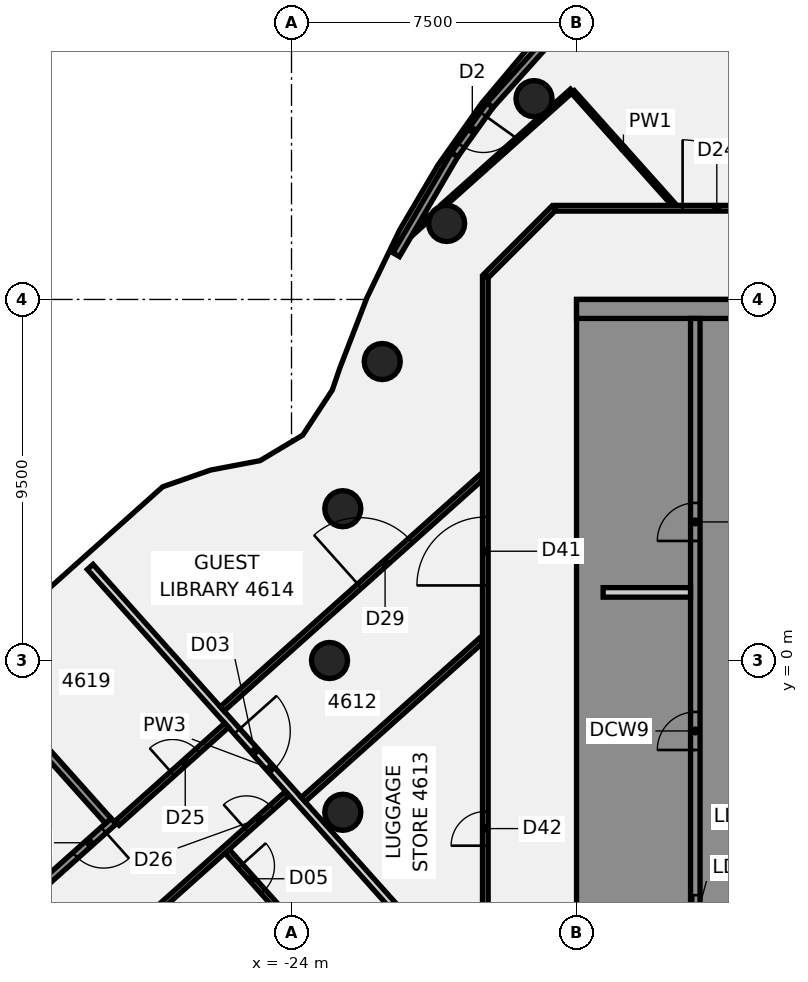
"""IFC4 building model, lengths in metres.
Left out: names, types, materials, properties, quantities, classifications, styles, units other than length and angle.
Written with IfcOpenShell. Run it as: python <this file> out.ifc"""

import sys

from ifc_helpers import new_model, si_unit, direction, frame, frame_2d, origin, origin_2d, place, context, subcontext, project, spatial, polyline, rectangle, circle, outline, extrude, element, fill, save


model = new_model("IFC4")
c1 = context("Model", 3, precision=1e-05, world=origin(), true_north=direction((0.0, 1.0)))
c2 = subcontext(c1, "Body", "Model", "MODEL_VIEW")
j1 = project(units=[si_unit("LENGTHUNIT", "METRE"), si_unit("PLANEANGLEUNIT", "RADIAN")], contexts=[c1])
p1 = place(None, origin())
s1 = spatial("IfcSite", under=j1, at=p1, CompositionType="ELEMENT")
p2 = place(p1, origin())
s2 = spatial("IfcBuilding", under=s1, at=p2, CompositionType="ELEMENT")
p3 = place(p2, frame((0.0, 0.0, 186.1)))
s3 = spatial("IfcBuildingStorey", under=s2, at=p3, CompositionType="ELEMENT", Elevation=186.1)
for number, where, z_axis, x_axis in (
    (1, (-17.619, 14.784, -0.14), (0.0, 0.0, 1.0), (1.0, 0.0, 0.0)),
    (2, (-19.919, 11.5, -0.14), (0.0, 0.0, 1.0), (1.0, 0.0, 0.0)),
    (3, (-21.613, 7.866, -0.14), (0.0, 0.0, 1.0), (1.0, 0.0, 0.0)),
    (4, (-22.651, 3.994, -0.14), (0.0, 0.0, 1.0), (1.0, 0.0, 0.0)),
    (5, (-23.0, 0.0, -0.14), (0.0, 0.0, 1.0), (1.0, 0.0, 0.0)),
    (6, (-22.651, -3.994, -0.14), (0.0, 0.0, 1.0), (1.0, 0.0, 0.0)),
):
    element("IfcColumn", number, at=place(p3, frame(where, z_axis=z_axis, x_axis=x_axis)), inside=s3, PredefinedType="COLUMN", context=c2, shape_type="SweptSolid", body=[
        extrude(circle(Radius=0.475, at=origin_2d()), origin(), (0.0, 0.0, 1.0), 3.6),
    ])
p4 = place(p3, frame((-29.297, 2.462, 0.0), z_axis=(0.0, 0.0, 1.0), x_axis=(0.666350075951, -0.745639038866, 0.0)))
e7 = element("IfcWall", 7, at=p4, inside=s3, PredefinedType="PARTITIONING", context=c2, shape_type="SweptSolid", body=[
    extrude(rectangle(XDim=14.219, YDim=0.2, at=frame_2d((7.11, 0.0))), origin(), (0.0, 0.0, 1.0), 2.864),
])
p5 = place(p4, frame((5.799, 0.0, 0.0)))
e8 = element("IfcOpeningElement", 8, at=p5, cuts=e7, PredefinedType="OPENING", context=c2, shape_type="SweptSolid", body=[
    extrude(rectangle(XDim=1.4, YDim=2.1, at=frame_2d((0.7, 1.05))), frame((0.0, 0.11, 0.0), z_axis=(0.0, -1.0, 0.0), x_axis=(1.0, 0.0, 0.0)), (0.0, 0.0, 1.0), 0.22),
])
p6 = place(p3, frame((-25.695, -5.02, 0.0), z_axis=(0.0, 0.0, 1.0), x_axis=(0.666305353451, -0.7456790033, 0.0)))
e9 = element("IfcWall", 9, at=p6, inside=s3, PredefinedType="PARTITIONING", context=c2, shape_type="SweptSolid", body=[
    extrude(rectangle(XDim=2.479, YDim=0.15, at=frame_2d((1.24, 0.0))), origin(), (0.0, 0.0, 1.0), 2.864),
])
p7 = place(p6, frame((0.52, 0.0, 0.0)))
e10 = element("IfcOpeningElement", 10, at=p7, cuts=e9, PredefinedType="OPENING", context=c2, shape_type="SweptSolid", body=[
    extrude(rectangle(XDim=0.9, YDim=2.1, at=frame_2d((0.45, 1.05))), frame((0.0, 0.085, 0.0), z_axis=(0.0, -1.0, 0.0), x_axis=(1.0, 0.0, 0.0)), (0.0, 0.0, 1.0), 0.17),
])
p8 = place(p3, frame((-16.594, 14.959, 0.0), z_axis=(0.0, 0.0, 1.0), x_axis=(0.66652964255, -0.745478527928, 0.0)))
e11 = element("IfcWall", 11, at=p8, inside=s3, PredefinedType="PARTITIONING", context=c2, shape_type="SweptSolid", body=[
    extrude(rectangle(XDim=3.983, YDim=0.1, at=frame_2d((1.991, 0.0))), origin(), (0.0, 0.0, 1.0), 2.864),
])
p9 = place(p3, frame((-17.065, 11.9, 0.0), z_axis=(0.0, 0.0, 1.0), x_axis=(1.0, 0.0, 0.0)))
e12 = element("IfcWall", 12, at=p9, inside=s3, PredefinedType="PARTITIONING", context=c2, shape_type="SweptSolid", body=[
    extrude(rectangle(XDim=34.165, YDim=0.15, at=frame_2d((17.083, 0.0))), origin(), (0.0, 0.0, 1.0), 2.864),
])
p10 = place(p9, frame((24.547, 0.0, 0.0)))
e13 = element("IfcOpeningElement", 13, at=p10, cuts=e12, PredefinedType="OPENING", context=c2, shape_type="SweptSolid", body=[
    extrude(rectangle(XDim=1.8, YDim=2.1, at=frame_2d((0.9, 1.05))), frame((0.0, 0.085, 0.0), z_axis=(0.0, -1.0, 0.0), x_axis=(1.0, 0.0, 0.0)), (0.0, 0.0, 1.0), 0.17),
])
p11 = place(p9, frame((8.606, 0.0, 0.0)))
e14 = element("IfcOpeningElement", 14, at=p11, cuts=e12, PredefinedType="OPENING", context=c2, shape_type="SweptSolid", body=[
    extrude(rectangle(XDim=1.8, YDim=2.1, at=frame_2d((0.9, 1.05))), frame((0.0, 0.085, 0.0), z_axis=(0.0, -1.0, 0.0), x_axis=(1.0, 0.0, 0.0)), (0.0, 0.0, 1.0), 0.17),
])
p12 = place(p9, frame((3.356, 0.0, 0.0)))
e15 = element("IfcOpeningElement", 15, at=p12, cuts=e12, PredefinedType="OPENING", context=c2, shape_type="SweptSolid", body=[
    extrude(rectangle(XDim=1.8, YDim=2.1, at=frame_2d((0.9, 1.05))), frame((0.0, 0.085, 0.0), z_axis=(0.0, -1.0, 0.0), x_axis=(1.0, 0.0, 0.0)), (0.0, 0.0, 1.0), 0.17),
])
p13 = place(p3, frame((-28.586, -4.278, 0.0), z_axis=(0.0, 0.0, 1.0), x_axis=(0.745550479018, 0.666449160279, 0.0)))
e16 = element("IfcWall", 16, at=p13, inside=s3, PredefinedType="PARTITIONING", context=c2, shape_type="SweptSolid", body=[
    extrude(rectangle(XDim=3.861, YDim=0.15, at=frame_2d((1.931, 0.0))), origin(), (0.0, 0.0, 1.0), 2.864),
])
p14 = place(p13, frame((1.95, 0.0, 0.0)))
e17 = element("IfcOpeningElement", 17, at=p14, cuts=e16, PredefinedType="OPENING", context=c2, shape_type="SweptSolid", body=[
    extrude(rectangle(XDim=0.9, YDim=2.1, at=frame_2d((0.45, 1.05))), frame((0.0, 0.085, 0.0), z_axis=(0.0, -1.0, 0.0), x_axis=(1.0, 0.0, 0.0)), (0.0, 0.0, 1.0), 0.17),
])
p15 = place(p3, frame((-34.039, -12.371, 0.0), z_axis=(0.0, 0.0, 1.0), x_axis=(0.745755249161, 0.666220014972, 0.0)))
e18 = element("IfcWall", 18, at=p15, inside=s3, PredefinedType="PARTITIONING", context=c2, shape_type="SweptSolid", body=[
    extrude(rectangle(XDim=13.301, YDim=0.15, at=frame_2d((6.65, 0.0))), origin(), (0.0, 0.0, 1.0), 2.864),
])
p16 = place(p15, frame((11.871, 0.0, 0.0)))
e19 = element("IfcOpeningElement", 19, at=p16, cuts=e18, PredefinedType="OPENING", context=c2, shape_type="SweptSolid", body=[
    extrude(rectangle(XDim=0.9, YDim=2.1, at=frame_2d((0.45, 1.05))), frame((0.0, 0.085, 0.0), z_axis=(0.0, -1.0, 0.0), x_axis=(1.0, 0.0, 0.0)), (0.0, 0.0, 1.0), 0.17),
])
p17 = place(p15, frame((5.32, 0.0, 0.0)))
e20 = element("IfcOpeningElement", 20, at=p17, cuts=e18, PredefinedType="OPENING", context=c2, shape_type="SweptSolid", body=[
    extrude(rectangle(XDim=0.9, YDim=2.1, at=frame_2d((0.45, 1.05))), frame((0.0, 0.085, 0.0), z_axis=(0.0, -1.0, 0.0), x_axis=(1.0, 0.0, 0.0)), (0.0, 0.0, 1.0), 0.17),
])
p18 = place(p15, frame((3.021, 0.0, 0.0)))
e21 = element("IfcOpeningElement", 21, at=p18, cuts=e18, PredefinedType="OPENING", context=c2, shape_type="SweptSolid", body=[
    extrude(rectangle(XDim=0.9, YDim=2.1, at=frame_2d((0.45, 1.05))), frame((0.0, 0.085, 0.0), z_axis=(0.0, -1.0, 0.0), x_axis=(1.0, 0.0, 0.0)), (0.0, 0.0, 1.0), 0.17),
])
p19 = place(p3, frame((-25.824, -1.273, 0.0), z_axis=(0.0, 0.0, 1.0), x_axis=(0.745520592409, 0.666482592641, 0.0)))
e22 = element("IfcWall", 22, at=p19, inside=s3, PredefinedType="PARTITIONING", context=c2, shape_type="SweptSolid", body=[
    extrude(rectangle(XDim=9.143, YDim=0.15, at=frame_2d((4.572, 0.0))), origin(), (0.0, 0.0, 1.0), 2.864),
])
p20 = place(p19, frame((4.85, 0.0, 0.0)))
e23 = element("IfcOpeningElement", 23, at=p20, cuts=e22, PredefinedType="OPENING", context=c2, shape_type="SweptSolid", body=[
    extrude(rectangle(XDim=1.8, YDim=2.1, at=frame_2d((0.9, 1.05))), frame((0.0, 0.085, 0.0), z_axis=(0.0, -1.0, 0.0), x_axis=(1.0, 0.0, 0.0)), (0.0, 0.0, 1.0), 0.17),
])
p21 = place(p3, frame((-23.692, -3.658, 0.0), z_axis=(0.0, 0.0, 1.0), x_axis=(0.745594888816, 0.666399476119, 0.0)))
e24 = element("IfcWall", 24, at=p21, inside=s3, PredefinedType="PARTITIONING", context=c2, shape_type="SweptSolid", body=[
    extrude(rectangle(XDim=6.283, YDim=0.15, at=frame_2d((3.141, 0.0))), origin(), (0.0, 0.0, 1.0), 2.864),
])
p22 = place(p3, frame((-20.888, 11.188, 0.0), z_axis=(0.0, 0.0, 1.0), x_axis=(0.74557570649, 0.666420937465, 0.0)))
e25 = element("IfcWall", 25, at=p22, inside=s3, PredefinedType="PARTITIONING", context=c2, shape_type="SweptSolid", body=[
    extrude(rectangle(XDim=0.706, YDim=0.1, at=frame_2d((0.353, 0.0))), origin(), (0.0, 0.0, 1.0), 2.864),
])
p23 = place(p3, frame((-20.029, 11.955, 0.0), z_axis=(0.0, 0.0, 1.0), x_axis=(0.745614810603, 0.666377186141, 0.0)))
e26 = element("IfcWall", 26, at=p23, inside=s3, PredefinedType="PARTITIONING", context=c2, shape_type="SweptSolid", body=[
    extrude(rectangle(XDim=4.563, YDim=0.1, at=frame_2d((2.282, 0.0))), origin(), (0.0, 0.0, 1.0), 2.864),
])
p24 = place(p3, frame((-18.872, 10.128, 0.0), z_axis=(0.0, 0.0, 1.0), x_axis=(0.707106781187, 0.707106781187, 0.0)))
e27 = element("IfcWall", 27, at=p24, inside=s3, PredefinedType="PARTITIONING", context=c2, shape_type="SweptSolid", body=[
    extrude(rectangle(XDim=2.505, YDim=0.15, at=frame_2d((1.253, 0.0))), origin(), (0.0, 0.0, 1.0), 2.864),
])
p25 = place(p3, frame((-18.9, -10.1, 0.0), z_axis=(0.0, 0.0, 1.0), x_axis=(0.0, 1.0, 0.0)))
e28 = element("IfcWall", 28, at=p25, inside=s3, PredefinedType="PARTITIONING", context=c2, shape_type="SweptSolid", body=[
    extrude(rectangle(XDim=20.2, YDim=0.15, at=frame_2d((10.1, 0.0))), origin(), (0.0, 0.0, 1.0), 2.864),
])
p26 = place(p25, frame((12.075, 0.0, 0.0)))
e29 = element("IfcOpeningElement", 29, at=p26, cuts=e28, PredefinedType="OPENING", context=c2, shape_type="SweptSolid", body=[
    extrude(rectangle(XDim=1.8, YDim=2.1, at=frame_2d((0.9, 1.05))), frame((0.0, 0.085, 0.0), z_axis=(0.0, -1.0, 0.0), x_axis=(1.0, 0.0, 0.0)), (0.0, 0.0, 1.0), 0.17),
])
p27 = place(p25, frame((5.227, 0.0, 0.0)))
e30 = element("IfcOpeningElement", 30, at=p27, cuts=e28, PredefinedType="OPENING", context=c2, shape_type="SweptSolid", body=[
    extrude(rectangle(XDim=0.9, YDim=2.1, at=frame_2d((0.45, 1.05))), frame((0.0, 0.085, 0.0), z_axis=(0.0, -1.0, 0.0), x_axis=(1.0, 0.0, 0.0)), (0.0, 0.0, 1.0), 0.17),
])
p28 = place(p3, frame((-16.743, 16.881, 0.0), z_axis=(0.0, 0.0, 1.0), x_axis=(-0.667237213311, -0.744845286736, 0.0)))
e31 = element("IfcWall", 31, at=p28, inside=s3, PredefinedType="SOLIDWALL", context=c2, shape_type="SweptSolid", body=[
    extrude(rectangle(XDim=3.048, YDim=0.2, at=frame_2d((1.524, 0.0))), origin(), (0.0, 0.0, 1.0), 3.46),
])
p29 = place(p3, frame((-19.708, 13.309, 0.0), z_axis=(0.0, 0.0, 1.0), x_axis=(-0.504682807399, -0.863304849932, 0.0)))
e32 = element("IfcWall", 32, at=p29, inside=s3, PredefinedType="SOLIDWALL", context=c2, shape_type="SweptSolid", body=[
    extrude(rectangle(XDim=3.047, YDim=0.2, at=frame_2d((1.523, 0.0))), origin(), (0.0, 0.0, 1.0), 3.46),
])
p30 = place(p3, frame((-18.777, 14.611, 0.0), z_axis=(0.0, 0.0, 1.0), x_axis=(-0.58162792214, -0.81345495277, 0.0)))
e33 = element("IfcWall", 33, at=p30, inside=s3, PredefinedType="SOLIDWALL", context=c2, shape_type="SweptSolid", body=[
    extrude(rectangle(XDim=1.6, YDim=0.2, at=frame_2d((0.8, 0.0))), origin(), (0.0, 0.0, 1.0), 3.46),
])
p31 = place(p30, frame((0.3, 0.0, 0.0)))
e34 = element("IfcOpeningElement", 34, at=p31, cuts=e33, PredefinedType="OPENING", context=c2, shape_type="SweptSolid", body=[
    extrude(rectangle(XDim=1.0, YDim=2.4, at=frame_2d((0.5, 1.2))), frame((0.0, 0.11, 0.0), z_axis=(0.0, -1.0, 0.0), x_axis=(1.0, 0.0, 0.0)), (0.0, 0.0, 1.0), 0.22),
])
p32 = place(p3, origin())
e35 = element("IfcWall", 35, at=p32, inside=s3, PredefinedType="SHEAR", context=c2, shape_type="SweptSolid", body=[
    extrude(outline(polyline([(-13.5, -8.125), (-16.0, -8.125), (-16.0, -5.625), (-13.5, -5.625), (-13.5, -5.375), (-16.0, -5.375), (-16.0, 5.375), (-13.5, 5.375), (-13.5, 5.625), (-16.0, 5.625), (-16.0, 8.125), (-13.5, 8.125), (-13.5, 9.0), (-16.0, 9.0), (-16.5, 9.0), (-16.5, -9.0), (-16.0, -9.0), (-13.5, -9.0), (-13.5, -8.125)])), origin(), (0.0, 0.0, 1.0), 3.46),
])
p33 = place(p3, frame((-16.5, 9.25, 0.0), z_axis=(0.0, 0.0, 1.0), x_axis=(1.0, 0.0, 0.0)))
e36 = element("IfcWall", 36, at=p33, inside=s3, PredefinedType="SHEAR", context=c2, shape_type="SweptSolid", body=[
    extrude(rectangle(XDim=13.0, YDim=0.5, at=frame_2d((6.5, 0.0))), origin(), (0.0, 0.0, 1.0), 3.46),
])
p34 = place(p3, frame((-13.375, -9.0, 0.0), z_axis=(0.0, 0.0, 1.0), x_axis=(0.0, 1.0, 0.0)))
e37 = element("IfcWall", 37, at=p34, inside=s3, PredefinedType="SHEAR", context=c2, shape_type="SweptSolid", body=[
    extrude(rectangle(XDim=18.0, YDim=0.25, at=frame_2d((9.0, 0.0))), origin(), (0.0, 0.0, 1.0), 3.46),
])
p35 = place(p34, frame((1.425, 0.0, 0.0)))
e38 = element("IfcOpeningElement", 38, at=p35, cuts=e37, PredefinedType="OPENING", context=c2, shape_type="SweptSolid", body=[
    extrude(rectangle(XDim=1.4, YDim=2.1, at=frame_2d((0.7, 1.05))), frame((0.0, 0.135, 0.0), z_axis=(0.0, -1.0, 0.0), x_axis=(1.0, 0.0, 0.0)), (0.0, 0.0, 1.0), 0.27),
])
p36 = place(p34, frame((6.646, 0.0, 0.0)))
e39 = element("IfcOpeningElement", 39, at=p36, cuts=e37, PredefinedType="OPENING", context=c2, shape_type="SweptSolid", body=[
    extrude(rectangle(XDim=1.0, YDim=2.1, at=frame_2d((0.5, 1.05))), frame((0.0, 0.135, 0.0), z_axis=(0.0, -1.0, 0.0), x_axis=(1.0, 0.0, 0.0)), (0.0, 0.0, 1.0), 0.27),
])
p37 = place(p34, frame((12.146, 0.0, 0.0)))
e40 = element("IfcOpeningElement", 40, at=p37, cuts=e37, PredefinedType="OPENING", context=c2, shape_type="SweptSolid", body=[
    extrude(rectangle(XDim=1.0, YDim=2.1, at=frame_2d((0.5, 1.05))), frame((0.0, 0.135, 0.0), z_axis=(0.0, -1.0, 0.0), x_axis=(1.0, 0.0, 0.0)), (0.0, 0.0, 1.0), 0.27),
])
p38 = place(p3, frame((-15.8, 1.792, 0.0), z_axis=(0.0, 0.0, 1.0), x_axis=(1.0, 0.0, 0.0)))
e41 = element("IfcWall", 41, at=p38, inside=s3, PredefinedType="PARTITIONING", context=c2, shape_type="SweptSolid", body=[
    extrude(rectangle(XDim=2.3, YDim=0.25, at=frame_2d((1.15, 0.0))), origin(), (0.0, 0.0, 1.0), 3.46),
])
p39 = place(p3, frame((-28.682, -4.229, -0.14), z_axis=(0.0, 0.0, 1.0), x_axis=(-0.745554780112, -0.666444348654, 0.0)))
e42 = element("IfcWall", 42, at=p39, inside=s3, PredefinedType="SHEAR", context=c2, shape_type="SweptSolid", body=[
    extrude(rectangle(XDim=6.7, YDim=0.2, at=frame_2d((3.35, 0.0))), origin(), (0.0, 0.0, 1.0), 3.004),
])
p40 = place(p39, frame((0.35, 0.0, 0.0)))
e43 = element("IfcOpeningElement", 43, at=p40, cuts=e42, PredefinedType="OPENING", context=c2, shape_type="SweptSolid", body=[
    extrude(rectangle(XDim=1.0, YDim=2.1, at=frame_2d((0.5, 1.05))), frame((0.0, 0.11, 0.0), z_axis=(0.0, -1.0, 0.0), x_axis=(1.0, 0.0, 0.0)), (0.0, 0.0, 1.0), 0.22),
])
p41 = place(p3, frame((-30.956, -1.835, -0.14), z_axis=(0.0, 0.0, 1.0), x_axis=(0.666440186515, -0.745558500587, 0.0)))
e44 = element("IfcWall", 44, at=p41, inside=s3, PredefinedType="SHEAR", context=c2, shape_type="SweptSolid", body=[
    extrude(rectangle(XDim=3.2, YDim=0.2, at=frame_2d((1.6, 0.0))), origin(), (0.0, 0.0, 1.0), 3.004),
])
p42 = place(p5, origin())
e45 = element("IfcDoor", 45, at=p42, inside=s3, OperationType="DOUBLE_DOOR_SINGLE_SWING", PredefinedType="DOOR", context=c2, shape_type="SweptSolid", body=[
    extrude(rectangle(XDim=1.4, YDim=2.1, at=frame_2d((0.7, 1.05))), frame((0.0, 0.025, 0.0), z_axis=(0.0, -1.0, 0.0), x_axis=(1.0, 0.0, 0.0)), (0.0, 0.0, 1.0), 0.05),
])
fill(e8, e45)
p43 = place(p7, frame((0.9, 0.0, 0.0), z_axis=(0.0, 0.0, 1.0), x_axis=(-1.0, 0.0, 0.0)))
e46 = element("IfcDoor", 46, at=p43, inside=s3, OperationType="SINGLE_SWING_LEFT", PredefinedType="DOOR", context=c2, shape_type="SweptSolid", body=[
    extrude(rectangle(XDim=0.9, YDim=2.1, at=frame_2d((0.45, 1.05))), frame((0.0, 0.025, 0.0), z_axis=(0.0, -1.0, 0.0), x_axis=(1.0, 0.0, 0.0)), (0.0, 0.0, 1.0), 0.05),
])
fill(e10, e46)
p44 = place(p12, origin())
e47 = element("IfcDoor", 47, at=p44, inside=s3, OperationType="DOUBLE_DOOR_SINGLE_SWING", PredefinedType="DOOR", context=c2, shape_type="SweptSolid", body=[
    extrude(rectangle(XDim=1.8, YDim=2.1, at=frame_2d((0.9, 1.05))), frame((0.0, 0.025, 0.0), z_axis=(0.0, -1.0, 0.0), x_axis=(1.0, 0.0, 0.0)), (0.0, 0.0, 1.0), 0.05),
])
fill(e15, e47)
p45 = place(p14, origin())
e48 = element("IfcDoor", 48, at=p45, inside=s3, OperationType="SINGLE_SWING_LEFT", PredefinedType="DOOR", context=c2, shape_type="SweptSolid", body=[
    extrude(rectangle(XDim=0.9, YDim=2.1, at=frame_2d((0.45, 1.05))), frame((0.0, 0.025, 0.0), z_axis=(0.0, -1.0, 0.0), x_axis=(1.0, 0.0, 0.0)), (0.0, 0.0, 1.0), 0.05),
])
fill(e17, e48)
p46 = place(p16, frame((0.9, 0.0, 0.0), z_axis=(0.0, 0.0, 1.0), x_axis=(-1.0, 0.0, 0.0)))
e49 = element("IfcDoor", 49, at=p46, inside=s3, OperationType="SINGLE_SWING_RIGHT", PredefinedType="DOOR", context=c2, shape_type="SweptSolid", body=[
    extrude(rectangle(XDim=0.9, YDim=2.1, at=frame_2d((0.45, 1.05))), frame((0.0, 0.025, 0.0), z_axis=(0.0, -1.0, 0.0), x_axis=(1.0, 0.0, 0.0)), (0.0, 0.0, 1.0), 0.05),
])
fill(e19, e49)
p47 = place(p20, origin())
e50 = element("IfcDoor", 50, at=p47, inside=s3, OperationType="DOUBLE_DOOR_SINGLE_SWING", PredefinedType="DOOR", context=c2, shape_type="SweptSolid", body=[
    extrude(rectangle(XDim=1.8, YDim=2.1, at=frame_2d((0.9, 1.05))), frame((0.0, 0.025, 0.0), z_axis=(0.0, -1.0, 0.0), x_axis=(1.0, 0.0, 0.0)), (0.0, 0.0, 1.0), 0.05),
])
fill(e23, e50)
p48 = place(p26, frame((1.8, 0.0, 0.0), z_axis=(0.0, 0.0, 1.0), x_axis=(-1.0, 0.0, 0.0)))
e51 = element("IfcDoor", 51, at=p48, inside=s3, OperationType="DOUBLE_DOOR_SINGLE_SWING", PredefinedType="DOOR", context=c2, shape_type="SweptSolid", body=[
    extrude(rectangle(XDim=1.8, YDim=2.1, at=frame_2d((0.9, 1.05))), frame((0.0, 0.025, 0.0), z_axis=(0.0, -1.0, 0.0), x_axis=(1.0, 0.0, 0.0)), (0.0, 0.0, 1.0), 0.05),
])
fill(e29, e51)
p49 = place(p27, origin())
e52 = element("IfcDoor", 52, at=p49, inside=s3, OperationType="SINGLE_SWING_RIGHT", PredefinedType="DOOR", context=c2, shape_type="SweptSolid", body=[
    extrude(rectangle(XDim=0.9, YDim=2.1, at=frame_2d((0.45, 1.05))), frame((0.0, 0.025, 0.0), z_axis=(0.0, -1.0, 0.0), x_axis=(1.0, 0.0, 0.0)), (0.0, 0.0, 1.0), 0.05),
])
fill(e30, e52)
p50 = place(p31, origin())
e53 = element("IfcDoor", 53, at=p50, inside=s3, OperationType="SINGLE_SWING_LEFT", PredefinedType="DOOR", context=c2, shape_type="SweptSolid", body=[
    extrude(rectangle(XDim=1.0, YDim=2.4, at=frame_2d((0.5, 1.2))), frame((0.0, 0.025, 0.0), z_axis=(0.0, -1.0, 0.0), x_axis=(1.0, 0.0, 0.0)), (0.0, 0.0, 1.0), 0.05),
])
fill(e34, e53)
p51 = place(p35, origin())
e54 = element("IfcDoor", 54, at=p51, inside=s3, OperationType="SLIDING_TO_LEFT", PredefinedType="DOOR", context=c2, shape_type="SweptSolid", body=[
    extrude(rectangle(XDim=1.4, YDim=2.1, at=frame_2d((0.7, 1.05))), frame((0.0, 0.025, 0.0), z_axis=(0.0, -1.0, 0.0), x_axis=(1.0, 0.0, 0.0)), (0.0, 0.0, 1.0), 0.05),
])
fill(e38, e54)
p52 = place(p36, origin())
e55 = element("IfcDoor", 55, at=p52, inside=s3, OperationType="SINGLE_SWING_LEFT", PredefinedType="DOOR", context=c2, shape_type="SweptSolid", body=[
    extrude(rectangle(XDim=1.0, YDim=2.1, at=frame_2d((0.5, 1.05))), frame((0.0, 0.025, 0.0), z_axis=(0.0, -1.0, 0.0), x_axis=(1.0, 0.0, 0.0)), (0.0, 0.0, 1.0), 0.05),
])
fill(e39, e55)
p53 = place(p37, origin())
e56 = element("IfcDoor", 56, at=p53, inside=s3, OperationType="SINGLE_SWING_LEFT", PredefinedType="DOOR", context=c2, shape_type="SweptSolid", body=[
    extrude(rectangle(XDim=1.0, YDim=2.1, at=frame_2d((0.5, 1.05))), frame((0.0, 0.025, 0.0), z_axis=(0.0, -1.0, 0.0), x_axis=(1.0, 0.0, 0.0)), (0.0, 0.0, 1.0), 0.05),
])
fill(e40, e56)
p54 = place(p40, origin())
e57 = element("IfcDoor", 57, at=p54, inside=s3, OperationType="SINGLE_SWING_LEFT", PredefinedType="DOOR", context=c2, shape_type="SweptSolid", body=[
    extrude(rectangle(XDim=1.0, YDim=2.1, at=frame_2d((0.5, 1.05))), frame((0.0, 0.025, 0.0), z_axis=(0.0, -1.0, 0.0), x_axis=(1.0, 0.0, 0.0)), (0.0, 0.0, 1.0), 0.05),
])
fill(e43, e57)
save(model, sys.argv[1])
